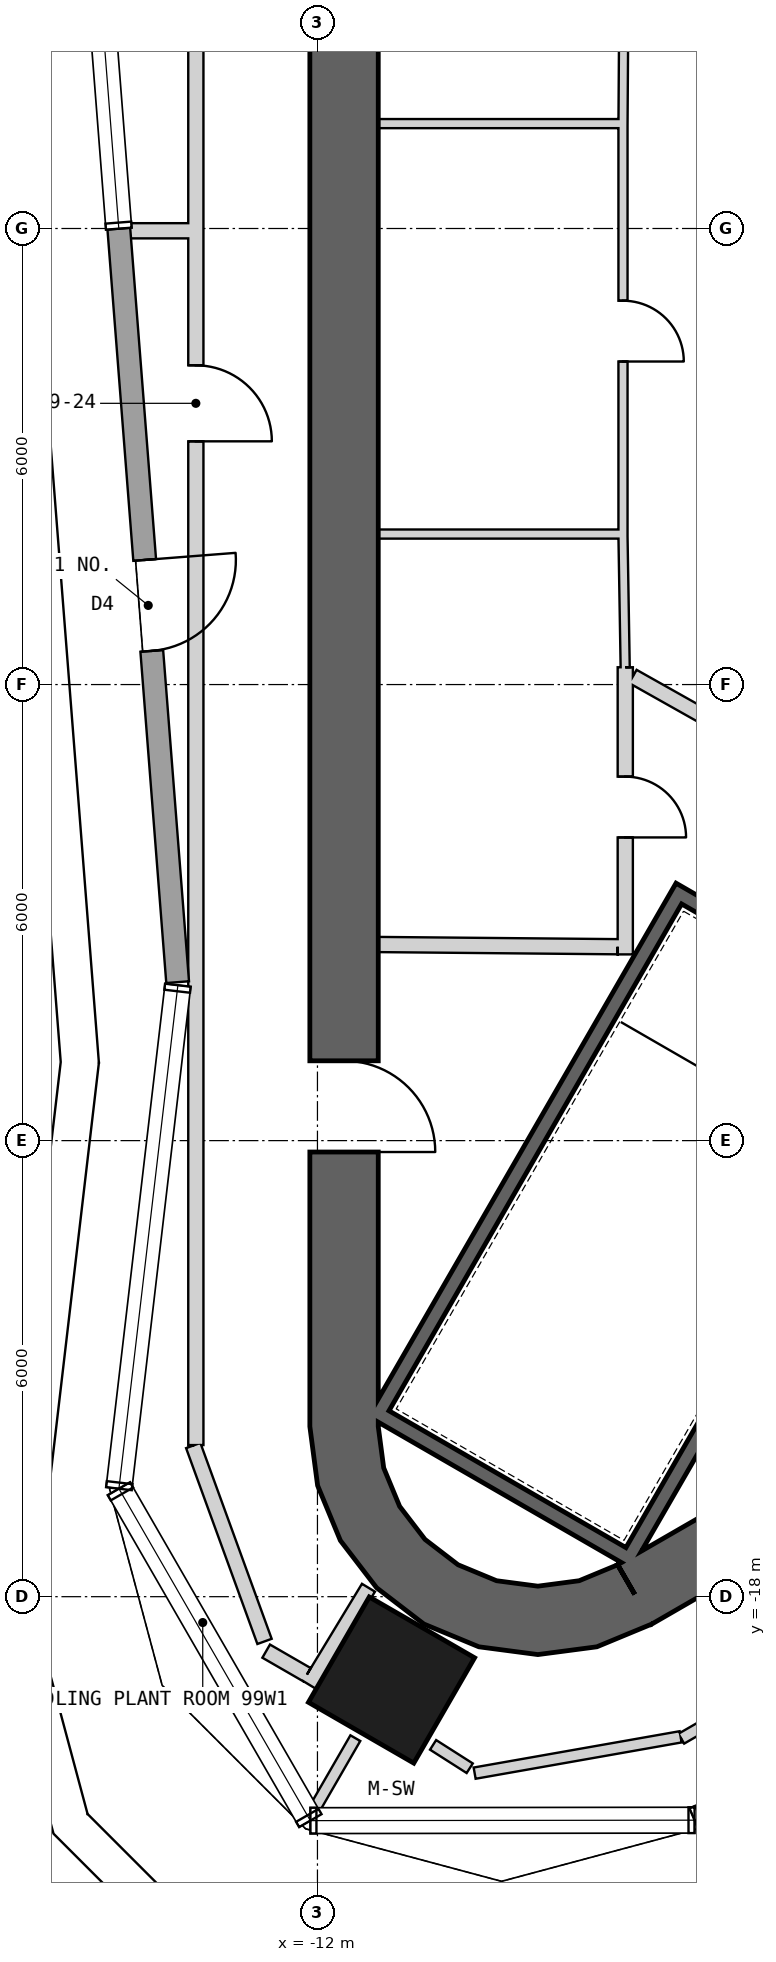
"""IFC4 building model, lengths in metres.
Left out: names, types, materials, properties, quantities, classifications, styles, units other than length and angle.
Written with IfcOpenShell. Run it as: python <this file> out.ifc"""

import sys

from ifc_helpers import new_model, si_unit, direction, frame, frame_2d, origin, origin_2d, place, context, subcontext, project, spatial, polyline, rectangle, outline, extrude, element, fill, save


model = new_model("IFC4")
c1 = context("Model", 3, precision=1e-05, world=origin(), true_north=direction((0.0, 1.0)))
c2 = subcontext(c1, "Body", "Model", "MODEL_VIEW")
j1 = project(units=[si_unit("LENGTHUNIT", "METRE"), si_unit("PLANEANGLEUNIT", "RADIAN")], contexts=[c1])
p1 = place(None, origin())
s1 = spatial("IfcSite", under=j1, at=p1, CompositionType="ELEMENT")
p2 = place(p1, origin())
s2 = spatial("IfcBuilding", under=s1, at=p2, CompositionType="ELEMENT")
p3 = place(p2, frame((0.0, 0.0, 440.3)))
s3 = spatial("IfcBuildingStorey", under=s2, at=p3, CompositionType="ELEMENT", Elevation=440.3)
p4 = place(p3, frame((-11.025, -19.097, 0.0), z_axis=(0.0, 0.0, 1.0), x_axis=(-0.5, -0.866025403784, 0.0)))
e1 = element("IfcColumn", 1, at=p4, inside=s3, PredefinedType="COLUMN", context=c2, shape_type="SweptSolid", body=[
    extrude(rectangle(XDim=1.6, YDim=1.6, at=origin_2d()), origin(), (0.0, 0.0, 1.0), 4.7),
])
p5 = place(p3, frame((19.475, 2.208, 0.0), z_axis=(0.0, 0.0, 1.0), x_axis=(-0.866028369851, 0.499994862586, 0.0)))
e2 = element("IfcWall", 2, at=p5, inside=s3, PredefinedType="SHEAR", context=c2, shape_type="SweptSolid", body=[
    extrude(rectangle(XDim=31.523, YDim=0.9, at=frame_2d((15.762, 0.0))), origin(), (0.0, 0.0, 1.0), 4.7),
])
p6 = place(p5, frame((3.612, 0.0, 0.0)))
e3 = element("IfcOpeningElement", 3, at=p6, cuts=e2, PredefinedType="OPENING", context=c2, shape_type="SweptSolid", body=[
    extrude(rectangle(XDim=1.2, YDim=2.4, at=frame_2d((0.6, 1.2))), frame((0.0, 0.46, 0.0), z_axis=(0.0, -1.0, 0.0), x_axis=(1.0, 0.0, 0.0)), (0.0, 0.0, 1.0), 0.92),
])
p7 = place(p5, frame((26.712, 0.0, 0.0)))
e4 = element("IfcOpeningElement", 4, at=p7, cuts=e2, PredefinedType="OPENING", context=c2, shape_type="SweptSolid", body=[
    extrude(rectangle(XDim=1.2, YDim=2.4, at=frame_2d((0.6, 1.2))), frame((0.0, 0.46, 0.0), z_axis=(0.0, -1.0, 0.0), x_axis=(1.0, 0.0, 0.0)), (0.0, 0.0, 1.0), 0.92),
])
p8 = place(p3, frame((-11.65, 15.762, 0.0), z_axis=(0.0, 0.0, 1.0), x_axis=(0.0, -1.0, 0.0)))
e5 = element("IfcWall", 5, at=p8, inside=s3, PredefinedType="SHEAR", context=c2, shape_type="SweptSolid", body=[
    extrude(rectangle(XDim=31.523, YDim=0.9, at=frame_2d((15.762, 0.0))), origin(), (0.0, 0.0, 1.0), 4.7),
])
p9 = place(p8, frame((3.612, 0.0, 0.0)))
e6 = element("IfcOpeningElement", 6, at=p9, cuts=e5, PredefinedType="OPENING", context=c2, shape_type="SweptSolid", body=[
    extrude(rectangle(XDim=1.2, YDim=2.4, at=frame_2d((0.6, 1.2))), frame((0.0, 0.46, 0.0), z_axis=(0.0, -1.0, 0.0), x_axis=(1.0, 0.0, 0.0)), (0.0, 0.0, 1.0), 0.92),
])
p10 = place(p8, frame((26.712, 0.0, 0.0)))
e7 = element("IfcOpeningElement", 7, at=p10, cuts=e5, PredefinedType="OPENING", context=c2, shape_type="SweptSolid", body=[
    extrude(rectangle(XDim=1.2, YDim=2.4, at=frame_2d((0.6, 1.2))), frame((0.0, 0.46, 0.0), z_axis=(0.0, -1.0, 0.0), x_axis=(1.0, 0.0, 0.0)), (0.0, 0.0, 1.0), 0.92),
])
p11 = place(p3, frame((-7.825, -17.97, 0.0), z_axis=(0.0, 0.0, 1.0), x_axis=(0.866028369851, 0.499994862586, 0.0)))
e8 = element("IfcWall", 8, at=p11, inside=s3, PredefinedType="SHEAR", context=c2, shape_type="SweptSolid", body=[
    extrude(rectangle(XDim=31.523, YDim=0.9, at=frame_2d((15.762, 0.0))), origin(), (0.0, 0.0, 1.0), 4.7),
])
p12 = place(p11, frame((17.862, 0.0, 0.0)))
e9 = element("IfcOpeningElement", 9, at=p12, cuts=e8, PredefinedType="OPENING", context=c2, shape_type="SweptSolid", body=[
    extrude(rectangle(XDim=1.2, YDim=2.4, at=frame_2d((0.6, 1.2))), frame((0.0, 0.46, 0.0), z_axis=(0.0, -1.0, 0.0), x_axis=(1.0, 0.0, 0.0)), (0.0, 0.0, 1.0), 0.92),
])
p13 = place(p11, frame((20.562, 0.0, 0.0)))
e10 = element("IfcOpeningElement", 10, at=p13, cuts=e8, PredefinedType="OPENING", context=c2, shape_type="SweptSolid", body=[
    extrude(rectangle(XDim=1.2, YDim=2.4, at=frame_2d((0.6, 1.2))), frame((0.0, 0.46, 0.0), z_axis=(0.0, -1.0, 0.0), x_axis=(1.0, 0.0, 0.0)), (0.0, 0.0, 1.0), 0.92),
])
p14 = place(p11, frame((26.712, 0.0, 0.0)))
e11 = element("IfcOpeningElement", 11, at=p14, cuts=e8, PredefinedType="OPENING", context=c2, shape_type="SweptSolid", body=[
    extrude(rectangle(XDim=1.2, YDim=2.4, at=frame_2d((0.6, 1.2))), frame((0.0, 0.46, 0.0), z_axis=(0.0, -1.0, 0.0), x_axis=(1.0, 0.0, 0.0)), (0.0, 0.0, 1.0), 0.92),
])
p15 = place(p11, frame((3.612, 0.0, 0.0)))
e12 = element("IfcOpeningElement", 12, at=p15, cuts=e8, PredefinedType="OPENING", context=c2, shape_type="SweptSolid", body=[
    extrude(rectangle(XDim=1.2, YDim=2.4, at=frame_2d((0.6, 1.2))), frame((0.0, 0.46, 0.0), z_axis=(0.0, -1.0, 0.0), x_axis=(1.0, 0.0, 0.0)), (0.0, 0.0, 1.0), 0.92),
])
p16 = place(p3, origin())
e13 = element("IfcWall", 13, at=p16, inside=s3, PredefinedType="SHEAR", context=c2, shape_type="SweptSolid", body=[
    extrude(outline(polyline([(-12.1, -15.762), (-11.998, -16.538), (-11.698, -17.262), (-11.221, -17.883), (-10.6, -18.36), (-9.876, -18.659), (-9.1, -18.762), (-8.323, -18.659), (-7.6, -18.36), (-8.05, -17.58), (-8.556, -17.79), (-9.1, -17.862), (-9.644, -17.79), (-10.15, -17.58), (-10.585, -17.247), (-10.919, -16.812), (-11.128, -16.305), (-11.2, -15.762), (-12.1, -15.762)])), origin(), (0.0, 0.0, 1.0), 4.7),
])
p17 = place(p3, frame((-14.614, -0.002, 0.0), z_axis=(0.0, 0.0, 1.0), x_axis=(0.077860592968, -0.996964256161, 0.0)))
e14 = element("IfcWall", 14, at=p17, inside=s3, PredefinedType="SOLIDWALL", context=c2, shape_type="SweptSolid", body=[
    extrude(rectangle(XDim=9.943, YDim=0.3, at=frame_2d((4.972, 0.0))), origin(), (0.0, 0.0, 1.0), 4.7),
])
p18 = place(p17, frame((4.372, 0.0, 0.0)))
e15 = element("IfcOpeningElement", 15, at=p18, cuts=e14, PredefinedType="OPENING", context=c2, shape_type="SweptSolid", body=[
    extrude(rectangle(XDim=1.2, YDim=2.4, at=frame_2d((0.6, 1.2))), frame((0.0, 0.16, 0.0), z_axis=(0.0, -1.0, 0.0), x_axis=(1.0, 0.0, 0.0)), (0.0, 0.0, 1.0), 0.32),
])
p19 = place(p3, frame((-3.905, -10.563, -0.25), z_axis=(0.0, 0.0, 1.0), x_axis=(-0.500012932018, -0.866017937352, 0.0)))
e16 = element("IfcWall", 16, at=p19, inside=s3, PredefinedType="SHEAR", context=c2, shape_type="SweptSolid", body=[
    extrude(rectangle(XDim=8.1, YDim=0.2, at=frame_2d((4.05, 0.0))), origin(), (0.0, 0.0, 1.0), 4.95),
])
p20 = place(p3, frame((-11.282, -15.541, -0.25), z_axis=(0.0, 0.0, 1.0), x_axis=(0.866000483506, -0.500043160704, 0.0)))
e17 = element("IfcWall", 17, at=p20, inside=s3, PredefinedType="SHEAR", context=c2, shape_type="SweptSolid", body=[
    extrude(rectangle(XDim=3.8, YDim=0.2, at=frame_2d((1.9, 0.0))), origin(), (0.0, 0.0, 1.0), 4.95),
])
p21 = place(p3, frame((-7.196, -8.663, -0.25), z_axis=(0.0, 0.0, 1.0), x_axis=(-0.499997992926, -0.866026562566, 0.0)))
e18 = element("IfcWall", 18, at=p21, inside=s3, PredefinedType="SHEAR", context=c2, shape_type="SweptSolid", body=[
    extrude(rectangle(XDim=7.9, YDim=0.2, at=frame_2d((3.95, 0.0))), origin(), (0.0, 0.0, 1.0), 4.95),
])
p22 = place(p3, frame((-4.041, -10.599, -0.25), z_axis=(0.0, 0.0, 1.0), x_axis=(-0.866047807691, 0.499961193289, 0.0)))
e19 = element("IfcWall", 19, at=p22, inside=s3, PredefinedType="SHEAR", context=c2, shape_type="SweptSolid", body=[
    extrude(rectangle(XDim=3.6, YDim=0.2, at=frame_2d((1.8, 0.0))), origin(), (0.0, 0.0, 1.0), 4.95),
])
p23 = place(p22, frame((1.25, 0.0, 0.25)))
e20 = element("IfcOpeningElement", 20, at=p23, cuts=e19, PredefinedType="OPENING", context=c2, shape_type="SweptSolid", body=[
    extrude(rectangle(XDim=1.1, YDim=2.1, at=frame_2d((0.55, 1.05))), frame((0.0, 0.11, 0.0), z_axis=(0.0, -1.0, 0.0), x_axis=(1.0, 0.0, 0.0)), (0.0, 0.0, 1.0), 0.22),
])
p24 = place(p3, frame((-11.2, 1.38, 0.0), z_axis=(0.0, 0.0, 1.0), x_axis=(1.0, 0.0, 0.0)))
e21 = element("IfcWall", 21, at=p24, inside=s3, PredefinedType="PARTITIONING", context=c2, shape_type="SweptSolid", body=[
    extrude(rectangle(XDim=3.25, YDim=0.12, at=frame_2d((1.625, 0.0))), origin(), (0.0, 0.0, 1.0), 4.7),
])
p25 = place(p3, frame((-7.95, -9.55, 0.0), z_axis=(0.0, 0.0, 1.0), x_axis=(0.0, 1.0, 0.0)))
e22 = element("IfcWall", 22, at=p25, inside=s3, PredefinedType="PARTITIONING", context=c2, shape_type="SweptSolid", body=[
    extrude(rectangle(XDim=3.778, YDim=0.2, at=frame_2d((1.889, 0.0))), origin(), (0.0, 0.0, 1.0), 4.7),
])
p26 = place(p25, frame((1.539, 0.0, 0.0)))
e23 = element("IfcOpeningElement", 23, at=p26, cuts=e22, PredefinedType="OPENING", context=c2, shape_type="SweptSolid", body=[
    extrude(rectangle(XDim=0.8, YDim=2.1, at=frame_2d((0.4, 1.05))), frame((0.0, 0.11, 0.0), z_axis=(0.0, -1.0, 0.0), x_axis=(1.0, 0.0, 0.0)), (0.0, 0.0, 1.0), 0.22),
])
p27 = place(p3, frame((-7.95, 5.772, 0.0), z_axis=(0.0, 0.0, 1.0), x_axis=(-0.006679767059, -0.999977690107, 0.0)))
e24 = element("IfcWall", 24, at=p27, inside=s3, PredefinedType="PARTITIONING", context=c2, shape_type="SweptSolid", body=[
    extrude(rectangle(XDim=4.422, YDim=0.12, at=frame_2d((2.211, 0.0))), origin(), (0.0, 0.0, 1.0), 4.7),
])
p28 = place(p3, frame((-11.2, -4.02, 0.0), z_axis=(0.0, 0.0, 1.0), x_axis=(1.0, 0.0, 0.0)))
e25 = element("IfcWall", 25, at=p28, inside=s3, PredefinedType="PARTITIONING", context=c2, shape_type="SweptSolid", body=[
    extrude(rectangle(XDim=3.25, YDim=0.12, at=frame_2d((1.625, 0.0))), origin(), (0.0, 0.0, 1.0), 4.7),
])
p29 = place(p3, frame((-7.98, 1.35, 0.0), z_axis=(0.0, 0.0, 1.0), x_axis=(0.0, -1.0, 0.0)))
e26 = element("IfcWall", 26, at=p29, inside=s3, PredefinedType="PARTITIONING", context=c2, shape_type="SweptSolid", body=[
    extrude(rectangle(XDim=5.4, YDim=0.12, at=frame_2d((2.7, 0.0))), origin(), (0.0, 0.0, 1.0), 4.7),
])
p30 = place(p29, frame((2.3, 0.0, 0.0)))
e27 = element("IfcOpeningElement", 27, at=p30, cuts=e26, PredefinedType="OPENING", context=c2, shape_type="SweptSolid", body=[
    extrude(rectangle(XDim=0.8, YDim=2.1, at=frame_2d((0.4, 1.05))), frame((0.0, 0.07, 0.0), z_axis=(0.0, -1.0, 0.0), x_axis=(1.0, 0.0, 0.0)), (0.0, 0.0, 1.0), 0.14),
])
p31 = place(p3, frame((-11.2, -9.42, 0.0), z_axis=(0.0, 0.0, 1.0), x_axis=(0.999957467379, -0.009222983926, 0.0)))
e28 = element("IfcWall", 28, at=p31, inside=s3, PredefinedType="PARTITIONING", context=c2, shape_type="SweptSolid", body=[
    extrude(rectangle(XDim=3.15, YDim=0.2, at=frame_2d((1.575, 0.0))), origin(), (0.0, 0.0, 1.0), 4.7),
])
p32 = place(p3, frame((-7.98, -4.05, 0.0), z_axis=(0.0, 0.0, 1.0), x_axis=(0.016723387416, -0.999860154378, 0.0)))
e29 = element("IfcWall", 29, at=p32, inside=s3, PredefinedType="PARTITIONING", context=c2, shape_type="SweptSolid", body=[
    extrude(rectangle(XDim=1.723, YDim=0.12, at=frame_2d((0.861, 0.0))), origin(), (0.0, 0.0, 1.0), 4.7),
])
p33 = place(p3, frame((-7.85, -5.893, 0.0), z_axis=(0.0, 0.0, 1.0), x_axis=(0.871350695252, -0.490660744185, 0.0)))
e30 = element("IfcWall", 30, at=p33, inside=s3, PredefinedType="PARTITIONING", context=c2, shape_type="SweptSolid", body=[
    extrude(rectangle(XDim=2.582, YDim=0.2, at=frame_2d((1.291, 0.0))), origin(), (0.0, 0.0, 1.0), 4.7),
])
p34 = place(p3, frame((-12.104, -19.161, 0.0), z_axis=(0.0, 0.0, 1.0), x_axis=(0.518475368733, 0.855092563421, 0.0)))
e31 = element("IfcWall", 31, at=p34, inside=s3, PredefinedType="PARTITIONING", context=c2, shape_type="SweptSolid", body=[
    extrude(rectangle(XDim=1.496, YDim=0.2, at=frame_2d((0.748, 0.0))), origin(), (0.0, 0.0, 1.0), 4.7),
])
p35 = place(p3, frame((-12.675, -18.717, 0.0), z_axis=(0.0, 0.0, 1.0), x_axis=(0.866047486323, -0.49996174997, 0.0)))
e32 = element("IfcWall", 32, at=p35, inside=s3, PredefinedType="PARTITIONING", context=c2, shape_type="SweptSolid", body=[
    extrude(rectangle(XDim=0.618, YDim=0.2, at=frame_2d((0.309, 0.0))), origin(), (0.0, 0.0, 1.0), 4.7),
])
p36 = place(p3, frame((-13.634, -16.011, 0.0), z_axis=(0.0, 0.0, 1.0), x_axis=(0.342043269434, -0.939684203248, 0.0)))
e33 = element("IfcWall", 33, at=p36, inside=s3, PredefinedType="PARTITIONING", context=c2, shape_type="SweptSolid", body=[
    extrude(rectangle(XDim=2.742, YDim=0.2, at=frame_2d((1.371, 0.0))), origin(), (0.0, 0.0, 1.0), 4.7),
])
p37 = place(p3, frame((-13.6, 16.206, 0.0), z_axis=(0.0, 0.0, 1.0), x_axis=(0.0, -1.0, 0.0)))
e34 = element("IfcWall", 34, at=p37, inside=s3, PredefinedType="PARTITIONING", context=c2, shape_type="SweptSolid", body=[
    extrude(rectangle(XDim=16.256, YDim=0.2, at=frame_2d((8.128, 0.0))), origin(), (0.0, 0.0, 1.0), 4.7),
])
p38 = place(p37, frame((7.7, 0.0, 0.0)))
e35 = element("IfcOpeningElement", 35, at=p38, cuts=e34, PredefinedType="OPENING", context=c2, shape_type="SweptSolid", body=[
    extrude(rectangle(XDim=1.0, YDim=2.1, at=frame_2d((0.5, 1.05))), frame((0.0, 0.11, 0.0), z_axis=(0.0, -1.0, 0.0), x_axis=(1.0, 0.0, 0.0)), (0.0, 0.0, 1.0), 0.22),
])
p39 = place(p3, frame((-13.6, -0.05, 0.0), z_axis=(0.0, 0.0, 1.0), x_axis=(0.0, -1.0, 0.0)))
e36 = element("IfcWall", 36, at=p39, inside=s3, PredefinedType="PARTITIONING", context=c2, shape_type="SweptSolid", body=[
    extrude(rectangle(XDim=15.956, YDim=0.2, at=frame_2d((7.978, 0.0))), origin(), (0.0, 0.0, 1.0), 4.7),
])
p40 = place(p39, frame((1.75, 0.0, 0.0)))
e37 = element("IfcOpeningElement", 37, at=p40, cuts=e36, PredefinedType="OPENING", context=c2, shape_type="SweptSolid", body=[
    extrude(rectangle(XDim=1.0, YDim=2.1, at=frame_2d((0.5, 1.05))), frame((0.0, 0.11, 0.0), z_axis=(0.0, -1.0, 0.0), x_axis=(1.0, 0.0, 0.0)), (0.0, 0.0, 1.0), 0.22),
])
p41 = place(p3, frame((-14.486, -0.03, 0.0), z_axis=(0.0, 0.0, 1.0), x_axis=(1.0, 0.0, 0.0)))
e38 = element("IfcWall", 38, at=p41, inside=s3, PredefinedType="PARTITIONING", context=c2, shape_type="SweptSolid", body=[
    extrude(rectangle(XDim=0.786, YDim=0.2, at=frame_2d((0.393, 0.0))), origin(), (0.0, 0.0, 1.0), 4.7),
])
p42 = place(p3, frame((-11.501, -19.861, 0.0), z_axis=(0.0, 0.0, 1.0), x_axis=(-0.500107244371, -0.865963477364, 0.0)))
e39 = element("IfcWall", 39, at=p42, inside=s3, PredefinedType="PLUMBINGWALL", context=c2, shape_type="SweptSolid", body=[
    extrude(rectangle(XDim=1.098, YDim=0.15, at=frame_2d((0.549, 0.0))), origin(), (0.0, 0.0, 1.0), 4.7),
])
p43 = place(p3, frame((-7.213, -19.868, 0.0), z_axis=(0.0, 0.0, 1.0), x_axis=(0.866026120779, 0.499998758127, 0.0)))
e40 = element("IfcWall", 40, at=p43, inside=s3, PredefinedType="PLUMBINGWALL", context=c2, shape_type="SweptSolid", body=[
    extrude(rectangle(XDim=16.062, YDim=0.15, at=frame_2d((8.031, 0.0))), origin(), (0.0, 0.0, 1.0), 4.7),
])
p44 = place(p43, frame((7.675, 0.0, 0.0)))
e41 = element("IfcOpeningElement", 41, at=p44, cuts=e40, PredefinedType="OPENING", context=c2, shape_type="SweptSolid", body=[
    extrude(rectangle(XDim=0.8, YDim=2.1, at=frame_2d((0.4, 1.05))), frame((0.0, 0.085, 0.0), z_axis=(0.0, -1.0, 0.0), x_axis=(1.0, 0.0, 0.0)), (0.0, 0.0, 1.0), 0.17),
])
p45 = place(p3, frame((-9.932, -20.322, 0.0), z_axis=(0.0, 0.0, 1.0), x_axis=(0.984813908974, 0.173613261856, 0.0)))
e42 = element("IfcWall", 42, at=p45, inside=s3, PredefinedType="PLUMBINGWALL", context=c2, shape_type="SweptSolid", body=[
    extrude(rectangle(XDim=2.752, YDim=0.15, at=frame_2d((1.376, 0.0))), origin(), (0.0, 0.0, 1.0), 4.7),
])
p46 = place(p3, frame((-10.479, -19.95, 0.0), z_axis=(0.0, 0.0, 1.0), x_axis=(0.843309487859, -0.537428234917, 0.0)))
e43 = element("IfcWall", 43, at=p46, inside=s3, PredefinedType="PLUMBINGWALL", context=c2, shape_type="SweptSolid", body=[
    extrude(rectangle(XDim=0.572, YDim=0.15, at=frame_2d((0.286, 0.0))), origin(), (0.0, 0.0, 1.0), 4.7),
])
p47 = place(p18, frame((1.2, 0.0, 0.0), z_axis=(0.0, 0.0, 1.0), x_axis=(-1.0, 0.0, 0.0)))
e44 = element("IfcDoor", 44, at=p47, inside=s3, OperationType="SINGLE_SWING_RIGHT", PredefinedType="DOOR", context=c2, shape_type="SweptSolid", body=[
    extrude(rectangle(XDim=1.2, YDim=2.4, at=frame_2d((0.6, 1.2))), frame((0.0, 0.025, 0.0), z_axis=(0.0, -1.0, 0.0), x_axis=(1.0, 0.0, 0.0)), (0.0, 0.0, 1.0), 0.05),
])
fill(e15, e44)
p48 = place(p30, origin())
e45 = element("IfcDoor", 45, at=p48, inside=s3, OperationType="SINGLE_SWING_RIGHT", PredefinedType="USERDEFINED", context=c2, shape_type="SweptSolid", body=[
    extrude(rectangle(XDim=0.8, YDim=2.1, at=frame_2d((0.4, 1.05))), frame((0.0, 0.025, 0.0), z_axis=(0.0, -1.0, 0.0), x_axis=(1.0, 0.0, 0.0)), (0.0, 0.0, 1.0), 0.05),
])
fill(e27, e45)
p49 = place(p26, origin())
e46 = element("IfcDoor", 46, at=p49, inside=s3, OperationType="SINGLE_SWING_LEFT", PredefinedType="USERDEFINED", context=c2, shape_type="SweptSolid", body=[
    extrude(rectangle(XDim=0.8, YDim=2.1, at=frame_2d((0.4, 1.05))), frame((0.0, 0.025, 0.0), z_axis=(0.0, -1.0, 0.0), x_axis=(1.0, 0.0, 0.0)), (0.0, 0.0, 1.0), 0.05),
])
fill(e23, e46)
p50 = place(p40, origin())
e47 = element("IfcDoor", 47, at=p50, inside=s3, OperationType="SINGLE_SWING_RIGHT", PredefinedType="USERDEFINED", context=c2, shape_type="SweptSolid", body=[
    extrude(rectangle(XDim=1.0, YDim=2.1, at=frame_2d((0.5, 1.05))), frame((0.0, 0.025, 0.0), z_axis=(0.0, -1.0, 0.0), x_axis=(1.0, 0.0, 0.0)), (0.0, 0.0, 1.0), 0.05),
])
fill(e37, e47)
p51 = place(p10, origin())
e48 = element("IfcDoor", 48, at=p51, inside=s3, OperationType="SINGLE_SWING_RIGHT", PredefinedType="USERDEFINED", context=c2, shape_type="SweptSolid", body=[
    extrude(rectangle(XDim=1.2, YDim=2.4, at=frame_2d((0.6, 1.2))), frame((0.0, 0.025, 0.0), z_axis=(0.0, -1.0, 0.0), x_axis=(1.0, 0.0, 0.0)), (0.0, 0.0, 1.0), 0.05),
])
fill(e7, e48)
save(model, sys.argv[1])
